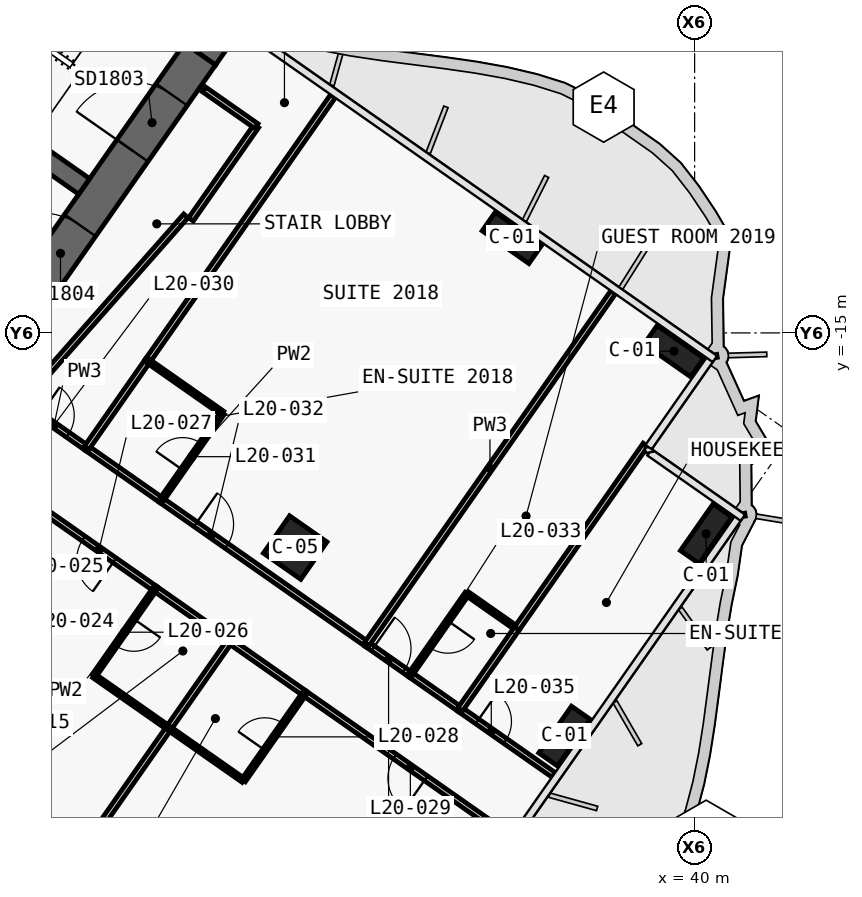
"""IFC4 building model, lengths in metres.
Left out: names, types, materials, properties, quantities, classifications, styles, units other than length and angle.
Written with IfcOpenShell. Run it as: python <this file> out.ifc"""

import sys

from ifc_helpers import new_model, si_unit, direction, frame, frame_2d, origin, origin_2d, place, context, subcontext, project, spatial, polyline, rectangle, outline, extrude, element, fill, save


model = new_model("IFC4")
c1 = context("Model", 3, precision=1e-05, world=origin(), true_north=direction((0.0, 1.0)))
c2 = subcontext(c1, "Body", "Model", "MODEL_VIEW")
j1 = project(units=[si_unit("LENGTHUNIT", "METRE"), si_unit("PLANEANGLEUNIT", "RADIAN")], contexts=[c1])
p1 = place(None, origin())
s1 = spatial("IfcSite", under=j1, at=p1, CompositionType="ELEMENT")
p2 = place(p1, origin())
s2 = spatial("IfcBuilding", under=s1, at=p2, CompositionType="ELEMENT")
p3 = place(p2, frame((0.0, 0.0, 97.7)))
s3 = spatial("IfcBuildingStorey", under=s2, at=p3, CompositionType="ELEMENT", Elevation=97.7)
p4 = place(p3, frame((-0.037, 11.867, 0.0), z_axis=(0.0, 0.0, 1.0), x_axis=(0.819155306259, -0.573571777746, 0.0)))
e1 = element("IfcWall", 1, at=p4, inside=s3, PredefinedType="SHEAR", context=c2, shape_type="SweptSolid", body=[
    extrude(outline(polyline([(33.837, 0.5), (0.0, 0.5), (0.7, -0.5), (33.837, -0.5), (33.837, 0.5)])), origin(), (0.0, 0.0, 1.0), 3.6),
])
p5 = place(p3, frame((21.708, -15.2, 0.0), z_axis=(0.0, 0.0, 1.0), x_axis=(0.573576324356, 0.819152122709, 0.0)))
e2 = element("IfcWall", 2, at=p5, inside=s3, PredefinedType="SHEAR", context=c2, shape_type="SweptSolid", body=[
    extrude(outline(polyline([(9.2, 0.5), (0.0, 0.5), (0.0, -0.5), (9.2, -0.5), (9.2, 0.5)])), origin(), (0.0, 0.0, 1.0), 3.6),
])
p6 = place(p5, frame((6.1, 0.0, 0.0)))
e3 = element("IfcOpeningElement", 3, at=p6, cuts=e2, PredefinedType="OPENING", context=c2, shape_type="SweptSolid", body=[
    extrude(rectangle(XDim=1.8, YDim=2.1, at=frame_2d((0.9, 1.05))), frame((0.0, 0.51, 0.0), z_axis=(0.0, -1.0, 0.0), x_axis=(1.0, 0.0, 0.0)), (0.0, 0.0, 1.0), 1.02),
])
p7 = place(p5, frame((1.9, 0.0, 0.0)))
e4 = element("IfcOpeningElement", 4, at=p7, cuts=e2, PredefinedType="OPENING", context=c2, shape_type="SweptSolid", body=[
    extrude(rectangle(XDim=1.8, YDim=2.1, at=frame_2d((0.9, 1.05))), frame((0.0, 0.51, 0.0), z_axis=(0.0, -1.0, 0.0), x_axis=(1.0, 0.0, 0.0)), (0.0, 0.0, 1.0), 1.02),
])
p8 = place(p3, frame((2.638, 3.768, 0.0), z_axis=(0.0, 0.0, 1.0), x_axis=(0.819148977158, -0.573580816643, 0.0)))
e5 = element("IfcWall", 5, at=p8, inside=s3, PredefinedType="SHEAR", context=c2, shape_type="SweptSolid", body=[
    extrude(outline(polyline([(0.0, 0.25), (0.0, -0.25), (26.0, -0.25), (26.0, 0.25), (0.0, 0.25)])), origin(), (0.0, 0.0, 1.0), 3.6),
])
p9 = place(p8, frame((9.637, 0.0, 0.0)))
e6 = element("IfcOpeningElement", 6, at=p9, cuts=e5, PredefinedType="OPENING", context=c2, shape_type="SweptSolid", body=[
    extrude(rectangle(XDim=1.2, YDim=2.1, at=frame_2d((0.6, 1.05))), frame((0.0, 0.26, 0.0), z_axis=(0.0, -1.0, 0.0), x_axis=(1.0, 0.0, 0.0)), (0.0, 0.0, 1.0), 0.52),
])
p10 = place(p8, frame((11.812, 0.0, 0.0)))
e7 = element("IfcOpeningElement", 7, at=p10, cuts=e5, PredefinedType="OPENING", context=c2, shape_type="SweptSolid", body=[
    extrude(rectangle(XDim=1.2, YDim=2.1, at=frame_2d((0.6, 1.05))), frame((0.0, 0.26, 0.0), z_axis=(0.0, -1.0, 0.0), x_axis=(1.0, 0.0, 0.0)), (0.0, 0.0, 1.0), 0.52),
])
p11 = place(p8, frame((13.988, 0.0, 0.0)))
e8 = element("IfcOpeningElement", 8, at=p11, cuts=e5, PredefinedType="OPENING", context=c2, shape_type="SweptSolid", body=[
    extrude(rectangle(XDim=1.2, YDim=2.1, at=frame_2d((0.6, 1.05))), frame((0.0, 0.26, 0.0), z_axis=(0.0, -1.0, 0.0), x_axis=(1.0, 0.0, 0.0)), (0.0, 0.0, 1.0), 0.52),
])
p12 = place(p8, frame((16.262, 0.0, 0.0)))
e9 = element("IfcOpeningElement", 9, at=p12, cuts=e5, PredefinedType="OPENING", context=c2, shape_type="SweptSolid", body=[
    extrude(rectangle(XDim=1.0, YDim=2.1, at=frame_2d((0.5, 1.05))), frame((0.0, 0.26, 0.0), z_axis=(0.0, -1.0, 0.0), x_axis=(1.0, 0.0, 0.0)), (0.0, 0.0, 1.0), 0.52),
])
for number, where, z_axis, x_axis in (
    (10, (35.197, -12.498, 0.0), (0.0, 0.0, 1.0), (0.819, -0.574, 0.0)),
    (11, (39.456, -15.481, 0.0), (0.0, 0.0, 1.0), (0.819, -0.574, 0.0)),
    (12, (36.575, -25.61, 0.0), (0.0, 0.0, 1.0), (0.574, 0.819, 0.0)),
    (13, (40.303, -20.286, 0.0), (0.0, 0.0, 1.0), (0.574, 0.819, 0.0)),
):
    element("IfcColumn", number, at=place(p3, frame(where, z_axis=z_axis, x_axis=x_axis)), inside=s3, PredefinedType="COLUMN", context=c2, shape_type="SweptSolid", body=[
        extrude(rectangle(XDim=1.5, YDim=0.6, at=origin_2d()), origin(), (0.0, 0.0, 1.0), 3.6),
    ])
p13 = place(p3, frame((29.49, -20.649, 0.0), z_axis=(0.0, 0.0, 1.0), x_axis=(0.819152044289, -0.573576436351, 0.0)))
e14 = element("IfcColumn", 14, at=p13, inside=s3, PredefinedType="COLUMN", context=c2, shape_type="SweptSolid", body=[
    extrude(rectangle(XDim=1.2, YDim=1.2, at=origin_2d()), origin(), (0.0, 0.0, 1.0), 3.6),
])
p14 = place(p3, frame((22.284, -16.824, 0.0), z_axis=(0.0, 0.0, 1.0), x_axis=(0.819160859995, -0.573563846013, 0.0)))
e15 = element("IfcWall", 15, at=p14, inside=s3, PredefinedType="PARTITIONING", context=c2, shape_type="SweptSolid", body=[
    extrude(rectangle(XDim=2.098, YDim=0.15, at=frame_2d((1.049, 0.0))), origin(), (0.0, 0.0, 1.0), 3.32),
])
p15 = place(p14, frame((0.599, 0.0, 0.0)))
e16 = element("IfcOpeningElement", 16, at=p15, cuts=e15, PredefinedType="OPENING", context=c2, shape_type="SweptSolid", body=[
    extrude(rectangle(XDim=0.9, YDim=2.1, at=frame_2d((0.45, 1.05))), frame((0.0, 0.085, 0.0), z_axis=(0.0, -1.0, 0.0), x_axis=(1.0, 0.0, 0.0)), (0.0, 0.0, 1.0), 0.17),
])
p16 = place(p3, frame((25.966, -19.403, 0.0), z_axis=(0.0, 0.0, 1.0), x_axis=(0.819171118839, -0.573549194106, 0.0)))
e17 = element("IfcWall", 17, at=p16, inside=s3, PredefinedType="PARTITIONING", context=c2, shape_type="SweptSolid", body=[
    extrude(rectangle(XDim=6.603, YDim=0.15, at=frame_2d((3.302, 0.0))), origin(), (0.0, 0.0, 1.0), 2.6),
])
p17 = place(p16, frame((1.101, 0.0, 0.0)))
e18 = element("IfcOpeningElement", 18, at=p17, cuts=e17, PredefinedType="OPENING", context=c2, shape_type="SweptSolid", body=[
    extrude(rectangle(XDim=1.0, YDim=2.1, at=frame_2d((0.5, 1.05))), frame((0.0, 0.085, 0.0), z_axis=(0.0, -1.0, 0.0), x_axis=(1.0, 0.0, 0.0)), (0.0, 0.0, 1.0), 0.17),
])
p18 = place(p3, frame((23.999, -18.025, 0.0), z_axis=(0.0, 0.0, 1.0), x_axis=(0.819146032251, -0.573585022335, 0.0)))
e19 = element("IfcWall", 19, at=p18, inside=s3, PredefinedType="PARTITIONING", context=c2, shape_type="SweptSolid", body=[
    extrude(rectangle(XDim=2.404, YDim=0.15, at=frame_2d((1.202, 0.0))), origin(), (0.0, 0.0, 1.0), 3.32),
])
p19 = place(p3, frame((31.372, -23.188, 0.0), z_axis=(0.0, 0.0, 1.0), x_axis=(0.819199220913, -0.573509055252, 0.0)))
e20 = element("IfcWall", 20, at=p19, inside=s3, PredefinedType="PARTITIONING", context=c2, shape_type="SweptSolid", body=[
    extrude(rectangle(XDim=1.403, YDim=0.15, at=frame_2d((0.702, 0.0))), origin(), (0.0, 0.0, 1.0), 3.32),
])
p20 = place(p19, frame((0.202, 0.0, 0.0)))
e21 = element("IfcOpeningElement", 21, at=p20, cuts=e20, PredefinedType="OPENING", context=c2, shape_type="SweptSolid", body=[
    extrude(rectangle(XDim=1.0, YDim=2.1, at=frame_2d((0.5, 1.05))), frame((0.0, 0.085, 0.0), z_axis=(0.0, -1.0, 0.0), x_axis=(1.0, 0.0, 0.0)), (0.0, 0.0, 1.0), 0.17),
])
p21 = place(p3, frame((32.519, -23.99, 0.0), z_axis=(0.0, 0.0, 1.0), x_axis=(0.819189013667, -0.573523634986, 0.0)))
e22 = element("IfcWall", 22, at=p21, inside=s3, PredefinedType="PARTITIONING", context=c2, shape_type="SweptSolid", body=[
    extrude(rectangle(XDim=1.604, YDim=0.15, at=frame_2d((0.802, 0.0))), origin(), (0.0, 0.0, 1.0), 3.32),
])
p22 = place(p3, frame((33.829, -24.908, 0.0), z_axis=(0.0, 0.0, 1.0), x_axis=(0.81915932427, -0.57356603932, 0.0)))
e23 = element("IfcWall", 23, at=p22, inside=s3, PredefinedType="PARTITIONING", context=c2, shape_type="SweptSolid", body=[
    extrude(rectangle(XDim=3.002, YDim=0.15, at=frame_2d((1.501, 0.0))), origin(), (0.0, 0.0, 1.0), 2.5),
])
p23 = place(p22, frame((0.551, 0.0, 0.0)))
e24 = element("IfcOpeningElement", 24, at=p23, cuts=e23, PredefinedType="OPENING", context=c2, shape_type="SweptSolid", body=[
    extrude(rectangle(XDim=0.9, YDim=2.1, at=frame_2d((0.45, 1.05))), frame((0.0, 0.085, 0.0), z_axis=(0.0, -1.0, 0.0), x_axis=(1.0, 0.0, 0.0)), (0.0, 0.0, 1.0), 0.17),
])
p24 = place(p3, frame((25.804, -21.73, 0.0), z_axis=(0.0, 0.0, 1.0), x_axis=(-0.819145961204, 0.573585123798, 0.0)))
e25 = element("IfcWall", 25, at=p24, inside=s3, PredefinedType="PARTITIONING", context=c2, shape_type="SweptSolid", body=[
    extrude(rectangle(XDim=3.603, YDim=0.15, at=frame_2d((1.802, 0.0))), origin(), (0.0, 0.0, 1.0), 3.32),
])
p25 = place(p24, frame((1.301, 0.0, 0.0)))
e26 = element("IfcOpeningElement", 26, at=p25, cuts=e25, PredefinedType="OPENING", context=c2, shape_type="SweptSolid", body=[
    extrude(rectangle(XDim=1.0, YDim=2.1, at=frame_2d((0.5, 1.05))), frame((0.0, 0.085, 0.0), z_axis=(0.0, -1.0, 0.0), x_axis=(1.0, 0.0, 0.0)), (0.0, 0.0, 1.0), 0.17),
])
p26 = place(p3, frame((27.771, -23.107, 0.0), z_axis=(0.0, 0.0, 1.0), x_axis=(-0.819179439794, 0.573537309527, 0.0)))
e27 = element("IfcWall", 27, at=p26, inside=s3, PredefinedType="PARTITIONING", context=c2, shape_type="SweptSolid", body=[
    extrude(rectangle(XDim=2.404, YDim=0.15, at=frame_2d((1.202, 0.0))), origin(), (0.0, 0.0, 1.0), 2.6),
])
p27 = place(p3, frame((35.141, -28.268, 0.0), z_axis=(0.0, 0.0, 1.0), x_axis=(-0.819155459934, 0.573571558274, 0.0)))
e28 = element("IfcWall", 28, at=p27, inside=s3, PredefinedType="PARTITIONING", context=c2, shape_type="SweptSolid", body=[
    extrude(rectangle(XDim=6.601, YDim=0.15, at=frame_2d((3.301, 0.0))), origin(), (0.0, 0.0, 1.0), 2.5),
])
p28 = place(p27, frame((2.7, 0.0, 0.0)))
e29 = element("IfcOpeningElement", 29, at=p28, cuts=e28, PredefinedType="OPENING", context=c2, shape_type="SweptSolid", body=[
    extrude(rectangle(XDim=1.0, YDim=2.1, at=frame_2d((0.5, 1.05))), frame((0.0, 0.085, 0.0), z_axis=(0.0, -1.0, 0.0), x_axis=(1.0, 0.0, 0.0)), (0.0, 0.0, 1.0), 0.17),
])
p29 = place(p3, frame((29.736, -24.484, 0.0), z_axis=(0.0, 0.0, 1.0), x_axis=(-0.819146032251, 0.573585022335, 0.0)))
e30 = element("IfcWall", 30, at=p29, inside=s3, PredefinedType="PARTITIONING", context=c2, shape_type="SweptSolid", body=[
    extrude(rectangle(XDim=2.404, YDim=0.15, at=frame_2d((1.202, 0.0))), origin(), (0.0, 0.0, 1.0), 2.6),
])
p30 = place(p3, frame((30.482, -8.77, 0.0), z_axis=(0.0, 0.0, 1.0), x_axis=(-0.573576058406, -0.819152308929, 0.0)))
e31 = element("IfcWall", 31, at=p30, inside=s3, PredefinedType="PARTITIONING", context=c2, shape_type="SweptSolid", body=[
    extrude(rectangle(XDim=8.501, YDim=0.15, at=frame_2d((4.25, 0.0))), origin(), (0.0, 0.0, 1.0), 2.6),
])
p31 = place(p3, frame((25.608, -15.731, 0.0), z_axis=(0.0, 0.0, 1.0), x_axis=(-0.573596837309, -0.819137759006, 0.0)))
e32 = element("IfcWall", 32, at=p31, inside=s3, PredefinedType="PARTITIONING", context=c2, shape_type="SweptSolid", body=[
    extrude(rectangle(XDim=2.802, YDim=0.15, at=frame_2d((1.401, 0.0))), origin(), (0.0, 0.0, 1.0), 2.6),
])
p32 = place(p3, frame((22.285, -16.825, 0.0), z_axis=(0.0, 0.0, 1.0), x_axis=(0.661551268245, 0.749899939647, 0.0)))
e33 = element("IfcWall", 33, at=p32, inside=s3, PredefinedType="PARTITIONING", context=c2, shape_type="SweptSolid", body=[
    extrude(rectangle(XDim=6.541, YDim=0.15, at=frame_2d((3.271, 0.0))), origin(), (0.0, 0.0, 1.0), 2.6),
])
p33 = place(p3, frame((26.746, -12.014, 0.0), z_axis=(0.0, 0.0, 1.0), x_axis=(0.573560650686, 0.819163097304, 0.0)))
e34 = element("IfcWall", 34, at=p33, inside=s3, PredefinedType="PARTITIONING", context=c2, shape_type="SweptSolid", body=[
    extrude(rectangle(XDim=3.0, YDim=0.15, at=frame_2d((1.5, 0.0))), origin(), (0.0, 0.0, 1.0), 3.32),
])
p34 = place(p3, frame((28.467, -9.556, 0.0), z_axis=(0.0, 0.0, 1.0), x_axis=(-0.819109000826, 0.573637903879, 0.0)))
e35 = element("IfcWall", 35, at=p34, inside=s3, PredefinedType="PARTITIONING", context=c2, shape_type="SweptSolid", body=[
    extrude(rectangle(XDim=1.68, YDim=0.15, at=frame_2d((0.84, 0.0))), origin(), (0.0, 0.0, 1.0), 3.32),
])
p35 = place(p3, frame((25.968, -19.404, 0.0), z_axis=(0.0, 0.0, 1.0), x_axis=(0.573591086599, 0.819141785879, 0.0)))
e36 = element("IfcWall", 36, at=p35, inside=s3, PredefinedType="PARTITIONING", context=c2, shape_type="SweptSolid", body=[
    extrude(rectangle(XDim=2.8, YDim=0.12, at=frame_2d((1.4, 0.0))), origin(), (0.0, 0.0, 1.0), 2.6),
])
p36 = place(p35, frame((0.975, 0.0, 0.0)))
e37 = element("IfcOpeningElement", 37, at=p36, cuts=e36, PredefinedType="OPENING", context=c2, shape_type="SweptSolid", body=[
    extrude(rectangle(XDim=0.85, YDim=2.05, at=frame_2d((0.425, 1.025))), frame((0.0, 0.07, 0.0), z_axis=(0.0, -1.0, 0.0), x_axis=(1.0, 0.0, 0.0)), (0.0, 0.0, 1.0), 0.14),
])
p37 = place(p3, frame((27.573, -17.109, 0.0), z_axis=(0.0, 0.0, 1.0), x_axis=(-0.819107643868, 0.573639841501, 0.0)))
e38 = element("IfcWall", 38, at=p37, inside=s3, PredefinedType="PARTITIONING", context=c2, shape_type="SweptSolid", body=[
    extrude(rectangle(XDim=2.4, YDim=0.12, at=frame_2d((1.2, 0.0))), origin(), (0.0, 0.0, 1.0), 3.32),
])
p38 = place(p3, frame((37.855, -13.932, 0.0), z_axis=(0.0, 0.0, 1.0), x_axis=(-0.573571089604, -0.819155788095, 0.0)))
e39 = element("IfcWall", 39, at=p38, inside=s3, PredefinedType="PARTITIONING", context=c2, shape_type="SweptSolid", body=[
    extrude(rectangle(XDim=11.3, YDim=0.15, at=frame_2d((5.65, 0.0))), origin(), (0.0, 0.0, 1.0), 2.5),
])
p39 = place(p3, frame((35.323, -22.779, 0.0), z_axis=(0.0, 0.0, 1.0), x_axis=(-0.81918174131, 0.573534022273, 0.0)))
e40 = element("IfcWall", 40, at=p39, inside=s3, PredefinedType="PARTITIONING", context=c2, shape_type="SweptSolid", body=[
    extrude(rectangle(XDim=1.6, YDim=0.12, at=frame_2d((0.8, 0.0))), origin(), (0.0, 0.0, 1.0), 3.32),
])
p40 = place(p3, frame((34.01, -21.861, 0.0), z_axis=(0.0, 0.0, 1.0), x_axis=(-0.573537965655, -0.819178980414, 0.0)))
e41 = element("IfcWall", 41, at=p40, inside=s3, PredefinedType="PARTITIONING", context=c2, shape_type="SweptSolid", body=[
    extrude(rectangle(XDim=2.6, YDim=0.12, at=frame_2d((1.3, 0.0))), origin(), (0.0, 0.0, 1.0), 2.6),
])
p41 = place(p40, frame((0.875, 0.0, 0.0)))
e42 = element("IfcOpeningElement", 42, at=p41, cuts=e41, PredefinedType="OPENING", context=c2, shape_type="SweptSolid", body=[
    extrude(rectangle(XDim=0.85, YDim=2.05, at=frame_2d((0.425, 1.025))), frame((0.0, 0.07, 0.0), z_axis=(0.0, -1.0, 0.0), x_axis=(1.0, 0.0, 0.0)), (0.0, 0.0, 1.0), 0.14),
])
p42 = place(p3, frame((38.708, -17.945, 0.0), z_axis=(0.0, 0.0, 1.0), x_axis=(-0.573573403315, -0.819154168035, 0.0)))
e43 = element("IfcWall", 43, at=p42, inside=s3, PredefinedType="PARTITIONING", context=c2, shape_type="SweptSolid", body=[
    extrude(rectangle(XDim=5.901, YDim=0.15, at=frame_2d((2.951, 0.0))), origin(), (0.0, 0.0, 1.0), 3.32),
])
p43 = place(p3, frame((35.322, -22.78, 0.0), z_axis=(0.0, 0.0, 1.0), x_axis=(-0.573537965655, -0.819178980414, 0.0)))
e44 = element("IfcWall", 44, at=p43, inside=s3, PredefinedType="PARTITIONING", context=c2, shape_type="SweptSolid", body=[
    extrude(rectangle(XDim=2.6, YDim=0.15, at=frame_2d((1.3, 0.0))), origin(), (0.0, 0.0, 1.0), 2.6),
])
p44 = place(p3, frame((25.802, -21.729, 0.0), z_axis=(0.0, 0.0, 1.0), x_axis=(-0.573608623498, -0.819129505664, 0.0)))
e45 = element("IfcWall", 45, at=p44, inside=s3, PredefinedType="PARTITIONING", context=c2, shape_type="SweptSolid", body=[
    extrude(rectangle(XDim=2.8, YDim=0.12, at=frame_2d((1.4, 0.0))), origin(), (0.0, 0.0, 1.0), 3.32),
])
p45 = place(p44, frame((0.975, 0.0, 0.0)))
e46 = element("IfcOpeningElement", 46, at=p45, cuts=e45, PredefinedType="OPENING", context=c2, shape_type="SweptSolid", body=[
    extrude(rectangle(XDim=0.85, YDim=2.05, at=frame_2d((0.425, 1.025))), frame((0.0, 0.07, 0.0), z_axis=(0.0, -1.0, 0.0), x_axis=(1.0, 0.0, 0.0)), (0.0, 0.0, 1.0), 0.14),
])
p46 = place(p3, frame((24.196, -24.024, 0.0), z_axis=(0.0, 0.0, 1.0), x_axis=(0.819155442668, -0.573571582932, 0.0)))
e47 = element("IfcWall", 47, at=p46, inside=s3, PredefinedType="PARTITIONING", context=c2, shape_type="SweptSolid", body=[
    extrude(rectangle(XDim=2.4, YDim=0.12, at=frame_2d((1.2, 0.0))), origin(), (0.0, 0.0, 1.0), 2.6),
])
p47 = place(p3, frame((26.162, -25.401, 0.0), z_axis=(0.0, 0.0, 1.0), x_axis=(-0.573594994199, -0.819139049631, 0.0)))
e48 = element("IfcWall", 48, at=p47, inside=s3, PredefinedType="PARTITIONING", context=c2, shape_type="SweptSolid", body=[
    extrude(rectangle(XDim=3.829, YDim=0.15, at=frame_2d((1.915, 0.0))), origin(), (0.0, 0.0, 1.0), 2.6),
])
p48 = place(p3, frame((27.769, -23.106, 0.0), z_axis=(0.0, 0.0, 1.0), x_axis=(-0.573608623498, -0.819129505664, 0.0)))
e49 = element("IfcWall", 49, at=p48, inside=s3, PredefinedType="PARTITIONING", context=c2, shape_type="SweptSolid", body=[
    extrude(rectangle(XDim=2.8, YDim=0.15, at=frame_2d((1.4, 0.0))), origin(), (0.0, 0.0, 1.0), 2.6),
])
p49 = place(p3, frame((26.162, -25.401, 0.0), z_axis=(0.0, 0.0, 1.0), x_axis=(0.819188907105, -0.573523787192, 0.0)))
e50 = element("IfcWall", 50, at=p49, inside=s3, PredefinedType="PARTITIONING", context=c2, shape_type="SweptSolid", body=[
    extrude(rectangle(XDim=2.4, YDim=0.12, at=frame_2d((1.2, 0.0))), origin(), (0.0, 0.0, 1.0), 2.6),
])
p50 = place(p3, frame((28.129, -26.777, 0.0), z_axis=(0.0, 0.0, 1.0), x_axis=(0.573608623498, 0.819129505664, 0.0)))
e51 = element("IfcWall", 51, at=p50, inside=s3, PredefinedType="PARTITIONING", context=c2, shape_type="SweptSolid", body=[
    extrude(rectangle(XDim=2.8, YDim=0.12, at=frame_2d((1.4, 0.0))), origin(), (0.0, 0.0, 1.0), 3.32),
])
p51 = place(p50, frame((0.975, 0.0, 0.0)))
e52 = element("IfcOpeningElement", 52, at=p51, cuts=e51, PredefinedType="OPENING", context=c2, shape_type="SweptSolid", body=[
    extrude(rectangle(XDim=0.85, YDim=2.05, at=frame_2d((0.425, 1.025))), frame((0.0, 0.07, 0.0), z_axis=(0.0, -1.0, 0.0), x_axis=(1.0, 0.0, 0.0)), (0.0, 0.0, 1.0), 0.14),
])
p52 = place(p6, origin())
e53 = element("IfcDoor", 53, at=p52, inside=s3, OperationType="DOUBLE_DOOR_SINGLE_SWING", PredefinedType="DOOR", context=c2, shape_type="SweptSolid", body=[
    extrude(rectangle(XDim=1.8, YDim=2.1, at=frame_2d((0.9, 1.05))), frame((0.0, 0.025, 0.0), z_axis=(0.0, -1.0, 0.0), x_axis=(1.0, 0.0, 0.0)), (0.0, 0.0, 1.0), 0.05),
])
fill(e3, e53)
p53 = place(p7, origin())
e54 = element("IfcDoor", 54, at=p53, inside=s3, OperationType="DOUBLE_DOOR_SINGLE_SWING", PredefinedType="DOOR", context=c2, shape_type="SweptSolid", body=[
    extrude(rectangle(XDim=1.8, YDim=2.1, at=frame_2d((0.9, 1.05))), frame((0.0, 0.025, 0.0), z_axis=(0.0, -1.0, 0.0), x_axis=(1.0, 0.0, 0.0)), (0.0, 0.0, 1.0), 0.05),
])
fill(e4, e54)
p54 = place(p45, origin())
e55 = element("IfcDoor", 55, at=p54, inside=s3, OperationType="SINGLE_SWING_RIGHT", PredefinedType="DOOR", context=c2, shape_type="SweptSolid", body=[
    extrude(rectangle(XDim=0.85, YDim=2.05, at=frame_2d((0.425, 1.025))), frame((0.0, 0.025, 0.0), z_axis=(0.0, -1.0, 0.0), x_axis=(1.0, 0.0, 0.0)), (0.0, 0.0, 1.0), 0.05),
])
fill(e46, e55)
p55 = place(p25, origin())
e56 = element("IfcDoor", 56, at=p55, inside=s3, OperationType="SINGLE_SWING_LEFT", PredefinedType="DOOR", context=c2, shape_type="SweptSolid", body=[
    extrude(rectangle(XDim=1.0, YDim=2.1, at=frame_2d((0.5, 1.05))), frame((0.0, 0.025, 0.0), z_axis=(0.0, -1.0, 0.0), x_axis=(1.0, 0.0, 0.0)), (0.0, 0.0, 1.0), 0.05),
])
fill(e26, e56)
p56 = place(p51, origin())
e57 = element("IfcDoor", 57, at=p56, inside=s3, OperationType="SINGLE_SWING_RIGHT", PredefinedType="DOOR", context=c2, shape_type="SweptSolid", body=[
    extrude(rectangle(XDim=0.85, YDim=2.05, at=frame_2d((0.425, 1.025))), frame((0.0, 0.025, 0.0), z_axis=(0.0, -1.0, 0.0), x_axis=(1.0, 0.0, 0.0)), (0.0, 0.0, 1.0), 0.05),
])
fill(e52, e57)
p57 = place(p28, origin())
e58 = element("IfcDoor", 58, at=p57, inside=s3, OperationType="SINGLE_SWING_LEFT", PredefinedType="DOOR", context=c2, shape_type="SweptSolid", body=[
    extrude(rectangle(XDim=1.0, YDim=2.1, at=frame_2d((0.5, 1.05))), frame((0.0, 0.025, 0.0), z_axis=(0.0, -1.0, 0.0), x_axis=(1.0, 0.0, 0.0)), (0.0, 0.0, 1.0), 0.05),
])
fill(e29, e58)
p58 = place(p15, origin())
e59 = element("IfcDoor", 59, at=p58, inside=s3, OperationType="SINGLE_SWING_RIGHT", PredefinedType="DOOR", context=c2, shape_type="SweptSolid", body=[
    extrude(rectangle(XDim=0.9, YDim=2.1, at=frame_2d((0.45, 1.05))), frame((0.0, 0.025, 0.0), z_axis=(0.0, -1.0, 0.0), x_axis=(1.0, 0.0, 0.0)), (0.0, 0.0, 1.0), 0.05),
])
fill(e16, e59)
p59 = place(p36, origin())
e60 = element("IfcDoor", 60, at=p59, inside=s3, OperationType="SINGLE_SWING_LEFT", PredefinedType="DOOR", context=c2, shape_type="SweptSolid", body=[
    extrude(rectangle(XDim=0.85, YDim=2.05, at=frame_2d((0.425, 1.025))), frame((0.0, 0.025, 0.0), z_axis=(0.0, -1.0, 0.0), x_axis=(1.0, 0.0, 0.0)), (0.0, 0.0, 1.0), 0.05),
])
fill(e37, e60)
p60 = place(p17, origin())
e61 = element("IfcDoor", 61, at=p60, inside=s3, OperationType="SINGLE_SWING_RIGHT", PredefinedType="DOOR", context=c2, shape_type="SweptSolid", body=[
    extrude(rectangle(XDim=1.0, YDim=2.1, at=frame_2d((0.5, 1.05))), frame((0.0, 0.025, 0.0), z_axis=(0.0, -1.0, 0.0), x_axis=(1.0, 0.0, 0.0)), (0.0, 0.0, 1.0), 0.05),
])
fill(e18, e61)
p61 = place(p41, origin())
e62 = element("IfcDoor", 62, at=p61, inside=s3, OperationType="SINGLE_SWING_RIGHT", PredefinedType="DOOR", context=c2, shape_type="SweptSolid", body=[
    extrude(rectangle(XDim=0.85, YDim=2.05, at=frame_2d((0.425, 1.025))), frame((0.0, 0.025, 0.0), z_axis=(0.0, -1.0, 0.0), x_axis=(1.0, 0.0, 0.0)), (0.0, 0.0, 1.0), 0.05),
])
fill(e42, e62)
p62 = place(p20, origin())
e63 = element("IfcDoor", 63, at=p62, inside=s3, OperationType="SINGLE_SWING_LEFT", PredefinedType="DOOR", context=c2, shape_type="SweptSolid", body=[
    extrude(rectangle(XDim=1.0, YDim=2.1, at=frame_2d((0.5, 1.05))), frame((0.0, 0.025, 0.0), z_axis=(0.0, -1.0, 0.0), x_axis=(1.0, 0.0, 0.0)), (0.0, 0.0, 1.0), 0.05),
])
fill(e21, e63)
p63 = place(p23, origin())
e64 = element("IfcDoor", 64, at=p63, inside=s3, OperationType="SINGLE_SWING_LEFT", PredefinedType="DOOR", context=c2, shape_type="SweptSolid", body=[
    extrude(rectangle(XDim=0.9, YDim=2.1, at=frame_2d((0.45, 1.05))), frame((0.0, 0.025, 0.0), z_axis=(0.0, -1.0, 0.0), x_axis=(1.0, 0.0, 0.0)), (0.0, 0.0, 1.0), 0.05),
])
fill(e24, e64)
save(model, sys.argv[1])
